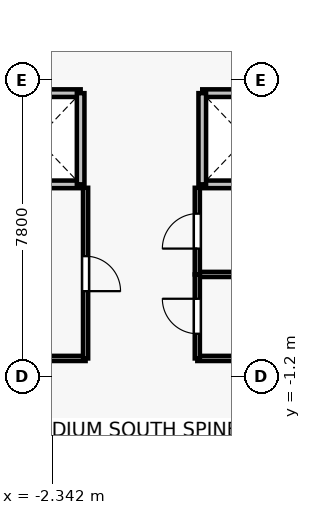
"""IFC4 building model, lengths in metres.
Left out: names, types, materials, properties, quantities, classifications, styles, units other than length and angle.
Written with IfcOpenShell. Run it as: python <this file> out.ifc"""

import sys

from ifc_helpers import new_model, si_unit, direction, frame, frame_2d, origin, place, context, subcontext, project, spatial, rectangle, extrude, source, transform, mapped, element, fill, save


model = new_model("IFC4")
c1 = context("Model", 3, precision=1e-05, world=origin(), true_north=direction((0.0, 1.0)))
c2 = subcontext(c1, "Body", "Model", "MODEL_VIEW")
j1 = project(units=[si_unit("LENGTHUNIT", "METRE"), si_unit("PLANEANGLEUNIT", "RADIAN")], contexts=[c1])
p1 = place(None, origin())
s1 = spatial("IfcSite", under=j1, at=p1, CompositionType="ELEMENT")
p2 = place(p1, origin())
s2 = spatial("IfcBuilding", under=s1, at=p2, CompositionType="ELEMENT")
p3 = place(p2, frame((0.0, 0.0, 5.0)))
s3 = spatial("IfcBuildingStorey", under=s2, at=p3, CompositionType="ELEMENT", Elevation=5.0)
for number, where, z_axis, x_axis in (
    (1, (-1.6, 3.85, 0.0), (0.0, 0.0, 1.0), (-1.0, 0.0, 0.0)),
    (2, (-3.9, 6.25, 0.0), (0.0, 0.0, 1.0), (1.0, 0.0, 0.0)),
):
    element("IfcWall", number, at=place(p3, frame(where, z_axis=z_axis, x_axis=x_axis)), inside=s3, PredefinedType="SOLIDWALL", context=c2, shape_type="SweptSolid", body=[
        extrude(rectangle(XDim=2.3, YDim=0.2, at=frame_2d((1.15, 0.0))), origin(), (0.0, 0.0, 1.0), 4.1),
    ])
p4 = place(p3, frame((-1.6, 6.25, 0.0), z_axis=(0.0, 0.0, 1.0), x_axis=(0.0, -1.0, 0.0)))
e3 = element("IfcWall", 3, at=p4, inside=s3, PredefinedType="SOLIDWALL", context=c2, shape_type="SweptSolid", body=[
    extrude(rectangle(XDim=2.4, YDim=0.2, at=frame_2d((1.2, 0.0))), origin(), (0.0, 0.0, 1.0), 4.1),
])
for number, where, z_axis, x_axis in (
    (4, (3.9, 3.85, 0.0), (0.0, 0.0, 1.0), (-1.0, 0.0, 0.0)),
    (5, (1.6, 6.25, 0.0), (0.0, 0.0, 1.0), (1.0, 0.0, 0.0)),
):
    element("IfcWall", number, at=place(p3, frame(where, z_axis=z_axis, x_axis=x_axis)), inside=s3, PredefinedType="SOLIDWALL", context=c2, shape_type="SweptSolid", body=[
        extrude(rectangle(XDim=2.3, YDim=0.2, at=frame_2d((1.15, 0.0))), origin(), (0.0, 0.0, 1.0), 4.1),
    ])
p5 = place(p3, frame((1.6, 3.85, 0.0), z_axis=(0.0, 0.0, 1.0), x_axis=(0.0, 1.0, 0.0)))
e6 = element("IfcWall", 6, at=p5, inside=s3, PredefinedType="SOLIDWALL", context=c2, shape_type="SweptSolid", body=[
    extrude(rectangle(XDim=2.4, YDim=0.2, at=frame_2d((1.2, 0.0))), origin(), (0.0, 0.0, 1.0), 4.1),
])
p6 = place(p3, frame((-1.47, -0.73, 0.0), z_axis=(0.0, 0.0, 1.0), x_axis=(-1.0, 0.0, 0.0)))
e7 = element("IfcWall", 7, at=p6, inside=s3, PredefinedType="PARTITIONING", context=c2, shape_type="SweptSolid", body=[
    extrude(rectangle(XDim=5.11, YDim=0.135, at=frame_2d((2.555, 0.0))), origin(), (0.0, 0.0, 1.0), 4.1),
])
p7 = place(p3, frame((-1.47, 3.76, 0.0), z_axis=(0.0, 0.0, 1.0), x_axis=(0.0, -1.0, 0.0)))
e8 = element("IfcWall", 8, at=p7, inside=s3, PredefinedType="PARTITIONING", context=c2, shape_type="SweptSolid", body=[
    extrude(rectangle(XDim=4.49, YDim=0.135, at=frame_2d((2.245, 0.0))), origin(), (0.0, 0.0, 1.0), 3.473),
])
p8 = place(p7, frame((1.8, 0.0, 0.0)))
e9 = element("IfcOpeningElement", 9, at=p8, cuts=e8, PredefinedType="OPENING", context=c2, shape_type="SweptSolid", body=[
    extrude(rectangle(XDim=0.92, YDim=2.1, at=frame_2d((0.46, 1.05))), frame((0.0, 0.077, 0.0), z_axis=(0.0, -1.0, 0.0), x_axis=(1.0, 0.0, 0.0)), (0.0, 0.0, 1.0), 0.155),
])
p9 = place(p3, frame((6.58, 1.48, 0.0), z_axis=(0.0, 0.0, 1.0), x_axis=(-1.0, 0.0, 0.0)))
e10 = element("IfcWall", 10, at=p9, inside=s3, PredefinedType="PARTITIONING", context=c2, shape_type="SweptSolid", body=[
    extrude(rectangle(XDim=5.11, YDim=0.135, at=frame_2d((2.555, 0.0))), origin(), (0.0, 0.0, 1.0), 4.1),
])
p10 = place(p3, frame((1.47, 1.48, 0.0), z_axis=(0.0, 0.0, 1.0), x_axis=(0.0, 1.0, 0.0)))
e11 = element("IfcWall", 11, at=p10, inside=s3, PredefinedType="PARTITIONING", context=c2, shape_type="SweptSolid", body=[
    extrude(rectangle(XDim=2.28, YDim=0.135, at=frame_2d((1.14, 0.0))), origin(), (0.0, 0.0, 1.0), 3.473),
])
p11 = place(p10, frame((0.68, 0.0, 0.0)))
e12 = element("IfcOpeningElement", 12, at=p11, cuts=e11, PredefinedType="OPENING", context=c2, shape_type="SweptSolid", body=[
    extrude(rectangle(XDim=0.92, YDim=2.1, at=frame_2d((0.46, 1.05))), frame((0.0, 0.077, 0.0), z_axis=(0.0, -1.0, 0.0), x_axis=(1.0, 0.0, 0.0)), (0.0, 0.0, 1.0), 0.155),
])
p12 = place(p3, frame((4.18, -0.73, 0.0), z_axis=(0.0, 0.0, 1.0), x_axis=(-1.0, 0.0, 0.0)))
e13 = element("IfcWall", 13, at=p12, inside=s3, PredefinedType="PARTITIONING", context=c2, shape_type="SweptSolid", body=[
    extrude(rectangle(XDim=2.71, YDim=0.135, at=frame_2d((1.355, 0.0))), origin(), (0.0, 0.0, 1.0), 4.1),
])
p13 = place(p3, frame((1.47, -0.73, 0.0), z_axis=(0.0, 0.0, 1.0), x_axis=(0.0, 1.0, 0.0)))
e14 = element("IfcWall", 14, at=p13, inside=s3, PredefinedType="PARTITIONING", context=c2, shape_type="SweptSolid", body=[
    extrude(rectangle(XDim=2.21, YDim=0.135, at=frame_2d((1.105, 0.0))), origin(), (0.0, 0.0, 1.0), 4.1),
])
p14 = place(p13, frame((0.65, 0.0, 0.0)))
e15 = element("IfcOpeningElement", 15, at=p14, cuts=e14, PredefinedType="OPENING", context=c2, shape_type="SweptSolid", body=[
    extrude(rectangle(XDim=0.92, YDim=2.1, at=frame_2d((0.46, 1.05))), frame((0.0, 0.077, 0.0), z_axis=(0.0, -1.0, 0.0), x_axis=(1.0, 0.0, 0.0)), (0.0, 0.0, 1.0), 0.155),
])
m1 = source(origin(), c2, "Body", "SweptSolid", [
    extrude(rectangle(XDim=0.92, YDim=2.1, at=frame_2d((0.46, 1.05))), frame((0.0, 0.025, 0.0), z_axis=(0.0, -1.0, 0.0), x_axis=(1.0, 0.0, 0.0)), (0.0, 0.0, 1.0), 0.05),
])
p15 = place(p8, origin())
e16 = element("IfcDoor", 16, at=p15, inside=s3, OperationType="SINGLE_SWING_RIGHT", PredefinedType="DOOR", context=c2, shape_type="MappedRepresentation", body=[
    mapped(m1, transform((0.0, 0.0, 0.0), x_axis=(1.0, 0.0, 0.0), y_axis=(0.0, 1.0, 0.0), z_axis=(0.0, 0.0, 1.0), scale=1.0)),
])
fill(e9, e16)
p16 = place(p11, origin())
e17 = element("IfcDoor", 17, at=p16, inside=s3, OperationType="SINGLE_SWING_LEFT", PredefinedType="DOOR", context=c2, shape_type="MappedRepresentation", body=[
    mapped(m1, transform((0.0, 0.0, 0.0), x_axis=(1.0, 0.0, 0.0), y_axis=(0.0, 1.0, 0.0), z_axis=(0.0, 0.0, 1.0), scale=1.0)),
])
fill(e12, e17)
p17 = place(p14, origin())
e18 = element("IfcDoor", 18, at=p17, inside=s3, OperationType="SINGLE_SWING_RIGHT", PredefinedType="DOOR", context=c2, shape_type="MappedRepresentation", body=[
    mapped(m1, transform((0.0, 0.0, 0.0), x_axis=(1.0, 0.0, 0.0), y_axis=(0.0, 1.0, 0.0), z_axis=(0.0, 0.0, 1.0), scale=1.0)),
])
fill(e15, e18)
save(model, sys.argv[1])
